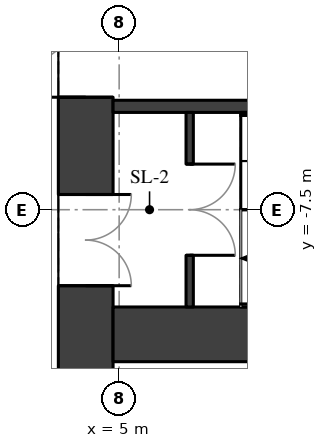
"""IFC4 building model, lengths in metres.
Left out: names, types, materials, properties, quantities, classifications, styles, units other than length and angle.
Written with IfcOpenShell. Run it as: python <this file> out.ifc"""

import sys

from ifc_helpers import new_model, si_unit, direction, frame, frame_2d, origin, place, context, subcontext, project, spatial, rectangle, extrude, element, fill, save


model = new_model("IFC4")
c1 = context("Model", 3, precision=1e-05, world=origin(), true_north=direction((0.0, 1.0)))
c2 = subcontext(c1, "Body", "Model", "MODEL_VIEW")
j1 = project(units=[si_unit("LENGTHUNIT", "METRE"), si_unit("PLANEANGLEUNIT", "RADIAN")], contexts=[c1])
p1 = place(None, origin())
s1 = spatial("IfcSite", under=j1, at=p1, CompositionType="ELEMENT")
p2 = place(p1, origin())
s2 = spatial("IfcBuilding", under=s1, at=p2, CompositionType="ELEMENT")
p3 = place(p2, frame((0.0, 0.0, 54.7)))
s3 = spatial("IfcBuildingStorey", under=s2, at=p3, CompositionType="ELEMENT", Elevation=54.7)
p4 = place(p3, frame((4.45, -11.1, 0.0), z_axis=(0.0, 0.0, 1.0), x_axis=(0.0, 1.0, 0.0)))
e1 = element("IfcWall", 1, at=p4, inside=s3, PredefinedType="SHEAR", context=c2, shape_type="SweptSolid", body=[
    extrude(rectangle(XDim=22.2, YDim=0.9, at=frame_2d((11.1, 0.0))), origin(), (0.0, 0.0, 1.0), 3.02),
])
p5 = place(p4, frame((2.35, 0.0, 0.0)))
e2 = element("IfcOpeningElement", 2, at=p5, cuts=e1, PredefinedType="OPENING", context=c2, shape_type="SweptSolid", body=[
    extrude(rectangle(XDim=1.5, YDim=2.1, at=frame_2d((0.75, 1.05))), frame((0.0, 0.46, 0.0), z_axis=(0.0, -1.0, 0.0), x_axis=(1.0, 0.0, 0.0)), (0.0, 0.0, 1.0), 0.92),
])
p6 = place(p4, frame((5.45, 0.0, 0.0)))
e3 = element("IfcOpeningElement", 3, at=p6, cuts=e1, PredefinedType="OPENING", context=c2, shape_type="SweptSolid", body=[
    extrude(rectangle(XDim=1.8, YDim=2.1, at=frame_2d((0.9, 1.05))), frame((0.0, 0.46, 0.0), z_axis=(0.0, -1.0, 0.0), x_axis=(1.0, 0.0, 0.0)), (0.0, 0.0, 1.0), 0.92),
])
p7 = place(p4, frame((7.95, 0.0, 0.0)))
e4 = element("IfcOpeningElement", 4, at=p7, cuts=e1, PredefinedType="OPENING", context=c2, shape_type="SweptSolid", body=[
    extrude(rectangle(XDim=1.1, YDim=2.1, at=frame_2d((0.55, 1.05))), frame((0.0, 0.46, 0.0), z_axis=(0.0, -1.0, 0.0), x_axis=(1.0, 0.0, 0.0)), (0.0, 0.0, 1.0), 0.92),
])
p8 = place(p4, frame((10.6, 0.0, 0.0)))
e5 = element("IfcOpeningElement", 5, at=p8, cuts=e1, PredefinedType="OPENING", context=c2, shape_type="SweptSolid", body=[
    extrude(rectangle(XDim=1.0, YDim=2.1, at=frame_2d((0.5, 1.05))), frame((0.0, 0.46, 0.0), z_axis=(0.0, -1.0, 0.0), x_axis=(1.0, 0.0, 0.0)), (0.0, 0.0, 1.0), 0.92),
])
p9 = place(p4, frame((13.15, 0.0, 0.0)))
e6 = element("IfcOpeningElement", 6, at=p9, cuts=e1, PredefinedType="OPENING", context=c2, shape_type="SweptSolid", body=[
    extrude(rectangle(XDim=1.1, YDim=2.1, at=frame_2d((0.55, 1.05))), frame((0.0, 0.46, 0.0), z_axis=(0.0, -1.0, 0.0), x_axis=(1.0, 0.0, 0.0)), (0.0, 0.0, 1.0), 0.92),
])
p10 = place(p4, frame((14.95, 0.0, 0.0)))
e7 = element("IfcOpeningElement", 7, at=p10, cuts=e1, PredefinedType="OPENING", context=c2, shape_type="SweptSolid", body=[
    extrude(rectangle(XDim=1.8, YDim=2.1, at=frame_2d((0.9, 1.05))), frame((0.0, 0.46, 0.0), z_axis=(0.0, -1.0, 0.0), x_axis=(1.0, 0.0, 0.0)), (0.0, 0.0, 1.0), 0.92),
])
p11 = place(p4, frame((18.35, 0.0, 0.0)))
e8 = element("IfcOpeningElement", 8, at=p11, cuts=e1, PredefinedType="OPENING", context=c2, shape_type="SweptSolid", body=[
    extrude(rectangle(XDim=1.5, YDim=2.1, at=frame_2d((0.75, 1.05))), frame((0.0, 0.46, 0.0), z_axis=(0.0, -1.0, 0.0), x_axis=(1.0, 0.0, 0.0)), (0.0, 0.0, 1.0), 0.92),
])
p12 = place(p3, frame((4.9, -9.55, 0.0), z_axis=(0.0, 0.0, 1.0), x_axis=(1.0, 0.0, 0.0)))
e9 = element("IfcWall", 9, at=p12, inside=s3, PredefinedType="SHEAR", context=c2, shape_type="SweptSolid", body=[
    extrude(rectangle(XDim=10.2, YDim=0.9, at=frame_2d((5.1, 0.0))), origin(), (0.0, 0.0, 1.0), 3.02),
])
p13 = place(p3, frame((4.9, -5.8, 0.0), z_axis=(0.0, 0.0, 1.0), x_axis=(1.0, 0.0, 0.0)))
e10 = element("IfcWall", 10, at=p13, inside=s3, PredefinedType="SHEAR", context=c2, shape_type="SweptSolid", body=[
    extrude(rectangle(XDim=10.2, YDim=0.2, at=frame_2d((5.1, 0.0))), origin(), (0.0, 0.0, 1.0), 3.02),
])
p14 = place(p3, frame((6.16, -9.1, 0.0), z_axis=(0.0, 0.0, 1.0), x_axis=(0.0, 1.0, 0.0)))
e11 = element("IfcWall", 11, at=p14, inside=s3, PredefinedType="SHEAR", context=c2, shape_type="SweptSolid", body=[
    extrude(rectangle(XDim=3.2, YDim=0.12, at=frame_2d((1.6, 0.0))), origin(), (0.0, 0.0, 1.0), 3.02),
])
p15 = place(p14, frame((0.85, 0.0, 0.0)))
e12 = element("IfcOpeningElement", 12, at=p15, cuts=e11, PredefinedType="OPENING", context=c2, shape_type="SweptSolid", body=[
    extrude(rectangle(XDim=1.5, YDim=2.1, at=frame_2d((0.75, 1.05))), frame((0.0, 0.07, 0.0), z_axis=(0.0, -1.0, 0.0), x_axis=(1.0, 0.0, 0.0)), (0.0, 0.0, 1.0), 0.14),
])
p16 = place(p5, origin())
e13 = element("IfcDoor", 13, at=p16, inside=s3, OperationType="DOUBLE_DOOR_SINGLE_SWING", PredefinedType="DOOR", context=c2, shape_type="SweptSolid", body=[
    extrude(rectangle(XDim=1.5, YDim=2.1, at=frame_2d((0.75, 1.05))), frame((0.0, 0.025, 0.0), z_axis=(0.0, -1.0, 0.0), x_axis=(1.0, 0.0, 0.0)), (0.0, 0.0, 1.0), 0.05),
])
fill(e2, e13)
p17 = place(p6, origin())
e14 = element("IfcDoor", 14, at=p17, inside=s3, OperationType="DOUBLE_DOOR_SINGLE_SWING", PredefinedType="DOOR", context=c2, shape_type="SweptSolid", body=[
    extrude(rectangle(XDim=1.8, YDim=2.1, at=frame_2d((0.9, 1.05))), frame((0.0, 0.025, 0.0), z_axis=(0.0, -1.0, 0.0), x_axis=(1.0, 0.0, 0.0)), (0.0, 0.0, 1.0), 0.05),
])
fill(e3, e14)
p18 = place(p15, origin())
e15 = element("IfcDoor", 15, at=p18, inside=s3, OperationType="DOUBLE_DOOR_SINGLE_SWING", PredefinedType="DOOR", context=c2, shape_type="SweptSolid", body=[
    extrude(rectangle(XDim=1.5, YDim=2.1, at=frame_2d((0.75, 1.05))), frame((0.0, 0.025, 0.0), z_axis=(0.0, -1.0, 0.0), x_axis=(1.0, 0.0, 0.0)), (0.0, 0.0, 1.0), 0.05),
])
fill(e12, e15)
save(model, sys.argv[1])
